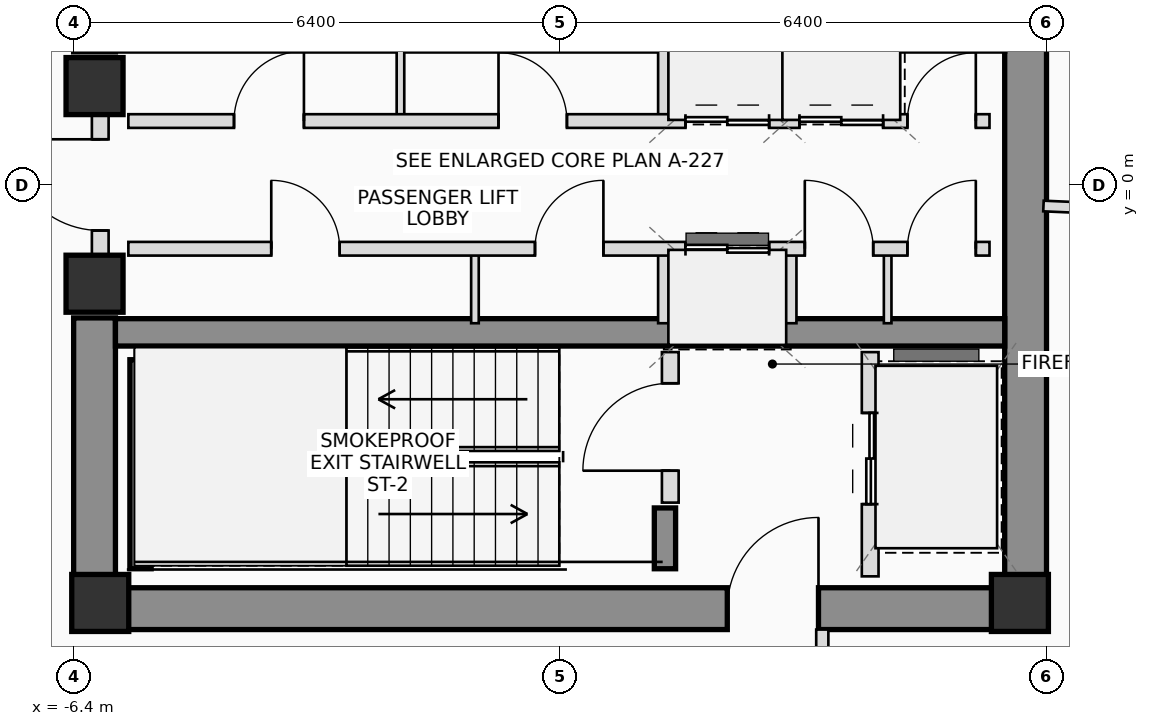
"""IFC4 building model, lengths in metres.
Left out: names, types, materials, properties, quantities, classifications, styles, units other than length and angle.
Written with IfcOpenShell. Run it as: python <this file> out.ifc"""

import sys

from ifc_helpers import new_model, si_unit, direction, frame, frame_2d, origin, origin_2d, place, context, subcontext, project, spatial, rectangle, extrude, source, transform, mapped, element, fill, save


model = new_model("IFC4")
c1 = context("Model", 3, precision=1e-05, world=origin(), true_north=direction((0.0, 1.0)))
c2 = subcontext(c1, "Body", "Model", "MODEL_VIEW")
j1 = project(units=[si_unit("LENGTHUNIT", "METRE"), si_unit("PLANEANGLEUNIT", "RADIAN")], contexts=[c1])
p1 = place(None, origin())
s1 = spatial("IfcSite", under=j1, at=p1, CompositionType="ELEMENT")
p2 = place(p1, origin())
s2 = spatial("IfcBuilding", under=s1, at=p2, CompositionType="ELEMENT")
p3 = place(p2, frame((0.0, 0.0, 296.75)))
s3 = spatial("IfcBuildingStorey", under=s2, at=p3, CompositionType="ELEMENT", Elevation=296.75)
m1 = source(origin(), c2, "Body", "SweptSolid", [
    extrude(rectangle(XDim=0.75, YDim=0.75, at=origin_2d()), origin(), (0.0, 0.0, 1.0), 3.45),
])
for number, where, z_axis, x_axis in (
    (1, (-6.05, -5.5, 0.0), (0.0, 0.0, 1.0), (1.0, 0.0, 0.0)),
    (2, (6.05, -5.5, 0.0), (0.0, 0.0, 1.0), (1.0, 0.0, 0.0)),
):
    element("IfcColumn", number, at=place(p3, frame(where, z_axis=z_axis, x_axis=x_axis)), inside=s3, PredefinedType="COLUMN", context=c2, shape_type="MappedRepresentation", body=[
        mapped(m1, transform((0.0, 0.0, 0.0), scale=1.0)),
    ])
p4 = place(p3, frame((-6.4, -5.575, 0.0), z_axis=(0.0, 0.0, 1.0), x_axis=(1.0, 0.0, 0.0)))
e3 = element("IfcWall", 3, at=p4, inside=s3, PredefinedType="SHEAR", context=c2, shape_type="SweptSolid", body=[
    extrude(rectangle(XDim=12.8, YDim=0.55, at=frame_2d((6.4, 0.0))), origin(), (0.0, 0.0, 1.0), 3.45),
])
p5 = place(p4, frame((8.6, 0.0, 0.0)))
e4 = element("IfcOpeningElement", 4, at=p5, cuts=e3, PredefinedType="OPENING", context=c2, shape_type="SweptSolid", body=[
    extrude(rectangle(XDim=1.2, YDim=2.2, at=frame_2d((0.6, 1.1))), frame((0.0, 0.285, 0.0), z_axis=(0.0, -1.0, 0.0), x_axis=(1.0, 0.0, 0.0)), (0.0, 0.0, 1.0), 0.57),
])
p6 = place(p3, frame((6.125, -5.3, 0.0), z_axis=(0.0, 0.0, 1.0), x_axis=(0.0, 1.0, 0.0)))
e5 = element("IfcWall", 5, at=p6, inside=s3, PredefinedType="SHEAR", context=c2, shape_type="SweptSolid", body=[
    extrude(rectangle(XDim=10.6, YDim=0.55, at=frame_2d((5.3, 0.0))), origin(), (0.0, 0.0, 1.0), 3.45),
])
p7 = place(p3, frame((-6.125, -5.3, 0.0), z_axis=(0.0, 0.0, 1.0), x_axis=(0.0, 1.0, 0.0)))
e6 = element("IfcWall", 6, at=p7, inside=s3, PredefinedType="SHEAR", context=c2, shape_type="SweptSolid", body=[
    extrude(rectangle(XDim=3.55, YDim=0.55, at=frame_2d((1.775, 0.0))), origin(), (0.0, 0.0, 1.0), 3.45),
])
p8 = place(p3, frame((-5.85, -1.94, 0.0), z_axis=(0.0, 0.0, 1.0), x_axis=(1.0, 0.0, 0.0)))
e7 = element("IfcWall", 7, at=p8, inside=s3, PredefinedType="SHEAR", context=c2, shape_type="SweptSolid", body=[
    extrude(rectangle(XDim=11.7, YDim=0.36, at=frame_2d((5.85, 0.0))), origin(), (0.0, 0.0, 1.0), 3.45),
])
p9 = place(p3, frame((-5.52, -5.05, 0.0), z_axis=(0.0, 0.0, 1.0), x_axis=(0.0, 1.0, 0.0)))
e8 = element("IfcWall", 8, at=p9, inside=s3, PredefinedType="SHEAR", context=c2, shape_type="SweptSolid", body=[
    extrude(rectangle(XDim=2.75, YDim=0.28, at=frame_2d((1.375, 0.0))), origin(), (0.0, 0.0, 1.0), 3.45),
])
p10 = place(p3, frame((1.38, -5.05, 0.0), z_axis=(0.0, 0.0, 1.0), x_axis=(0.0, 1.0, 0.0)))
e9 = element("IfcWall", 9, at=p10, inside=s3, PredefinedType="SHEAR", context=c2, shape_type="SweptSolid", body=[
    extrude(rectangle(XDim=0.8, YDim=0.28, at=frame_2d((0.4, 0.0))), origin(), (0.0, 0.0, 1.0), 3.45),
])
for number, where, z_axis, x_axis in (
    (10, (-6.125, -1.3, 0.0), (0.0, 0.0, 1.0), (1.0, 0.0, 0.0)),
    (11, (-6.125, 1.3, 0.0), (0.0, 0.0, 1.0), (1.0, 0.0, 0.0)),
):
    element("IfcColumn", number, at=place(p3, frame(where, z_axis=z_axis, x_axis=x_axis)), inside=s3, PredefinedType="COLUMN", context=c2, shape_type="MappedRepresentation", body=[
        mapped(m1, transform((0.0, 0.0, 0.0), scale=1.0)),
    ])
p11 = place(p3, frame((-6.05, -0.95, 0.0), z_axis=(0.0, 0.0, 1.0), x_axis=(0.0, 1.0, 0.0)))
e12 = element("IfcWall", 12, at=p11, inside=s3, PredefinedType="PLUMBINGWALL", context=c2, shape_type="SweptSolid", body=[
    extrude(rectangle(XDim=1.9, YDim=0.22, at=frame_2d((0.95, 0.0))), origin(), (0.0, 0.0, 1.0), 2.23),
])
p12 = place(p11, frame((0.35, 0.0, 0.0)))
e13 = element("IfcOpeningElement", 13, at=p12, cuts=e12, PredefinedType="OPENING", context=c2, shape_type="SweptSolid", body=[
    extrude(rectangle(XDim=1.2, YDim=2.2, at=frame_2d((0.6, 1.1))), frame((0.0, 0.12, 0.0), z_axis=(0.0, -1.0, 0.0), x_axis=(1.0, 0.0, 0.0)), (0.0, 0.0, 1.0), 0.24),
])
p13 = place(p3, frame((1.45, -4.18, 0.0), z_axis=(0.0, 0.0, 1.0), x_axis=(0.0, 1.0, 0.0)))
e14 = element("IfcWall", 14, at=p13, inside=s3, PredefinedType="PLUMBINGWALL", context=c2, shape_type="SweptSolid", body=[
    extrude(rectangle(XDim=1.98, YDim=0.22, at=frame_2d((0.99, 0.0))), origin(), (0.0, 0.0, 1.0), 3.25),
])
p14 = place(p13, frame((0.42, 0.0, 0.0)))
e15 = element("IfcOpeningElement", 15, at=p14, cuts=e14, PredefinedType="OPENING", context=c2, shape_type="SweptSolid", body=[
    extrude(rectangle(XDim=1.15, YDim=2.15, at=frame_2d((0.575, 1.075))), frame((0.0, 0.12, 0.0), z_axis=(0.0, -1.0, 0.0), x_axis=(1.0, 0.0, 0.0)), (0.0, 0.0, 1.0), 0.24),
])
p15 = place(p3, frame((4.08, -5.15, 0.0), z_axis=(0.0, 0.0, 1.0), x_axis=(0.0, 1.0, 0.0)))
e16 = element("IfcWall", 16, at=p15, inside=s3, PredefinedType="PLUMBINGWALL", context=c2, shape_type="SweptSolid", body=[
    extrude(rectangle(XDim=2.95, YDim=0.22, at=frame_2d((1.475, 0.0))), origin(), (0.0, 0.0, 1.0), 3.25),
])
p16 = place(p15, frame((0.95, 0.0, 0.0)))
e17 = element("IfcOpeningElement", 17, at=p16, cuts=e16, PredefinedType="OPENING", context=c2, shape_type="SweptSolid", body=[
    extrude(rectangle(XDim=1.2, YDim=2.25, at=frame_2d((0.6, 1.125))), frame((0.0, 0.12, 0.0), z_axis=(0.0, -1.0, 0.0), x_axis=(1.0, 0.0, 0.0)), (0.0, 0.0, 1.0), 0.24),
])
for number, where, z_axis, x_axis in (
    (18, (-2.1, 0.84, 0.0), (0.0, 0.0, 1.0), (0.0, 1.0, 0.0)),
    (19, (-1.12, -1.82, 0.0), (0.0, 0.0, 1.0), (0.0, 1.0, 0.0)),
):
    element("IfcWall", number, at=place(p3, frame(where, z_axis=z_axis, x_axis=x_axis)), inside=s3, PredefinedType="PARTITIONING", context=c2, shape_type="SweptSolid", body=[
        extrude(rectangle(XDim=0.98, YDim=0.1, at=frame_2d((0.49, 0.0))), origin(), (0.0, 0.0, 1.0), 3.25),
    ])
for number, where, z_axis, x_axis in (
    (20, (1.38, 0.84, 0.0), (0.0, 0.0, 1.0), (0.0, 1.0, 0.0)),
    (21, (1.38, -1.82, 0.0), (0.0, 0.0, 1.0), (0.0, 1.0, 0.0)),
    (22, (3.02, 0.84, 0.0), (0.0, 0.0, 1.0), (0.0, 1.0, 0.0)),
    (23, (4.38, 0.84, 0.0), (0.0, 0.0, 1.0), (0.0, 1.0, 0.0)),
    (24, (3.02, -1.82, 0.0), (0.0, 0.0, 1.0), (0.0, 1.0, 0.0)),
):
    element("IfcWall", number, at=place(p3, frame(where, z_axis=z_axis, x_axis=x_axis)), inside=s3, PredefinedType="PLUMBINGWALL", context=c2, shape_type="SweptSolid", body=[
        extrude(rectangle(XDim=0.98, YDim=0.18, at=frame_2d((0.49, 0.0))), origin(), (0.0, 0.0, 1.0), 3.25),
    ])
p17 = place(p3, frame((4.31, -1.82, 0.0), z_axis=(0.0, 0.0, 1.0), x_axis=(0.0, 1.0, 0.0)))
e25 = element("IfcWall", 25, at=p17, inside=s3, PredefinedType="PARTITIONING", context=c2, shape_type="SweptSolid", body=[
    extrude(rectangle(XDim=0.98, YDim=0.1, at=frame_2d((0.49, 0.0))), origin(), (0.0, 0.0, 1.0), 3.25),
])
p18 = place(p3, frame((-5.68, 0.84, 0.0), z_axis=(0.0, 0.0, 1.0), x_axis=(1.0, 0.0, 0.0)))
e26 = element("IfcWall", 26, at=p18, inside=s3, PredefinedType="PLUMBINGWALL", context=c2, shape_type="SweptSolid", body=[
    extrude(rectangle(XDim=11.33, YDim=0.18, at=frame_2d((5.665, 0.0))), origin(), (0.0, 0.0, 1.0), 3.25),
])
p19 = place(p18, frame((1.39, 0.0, 0.0)))
e27 = element("IfcOpeningElement", 27, at=p19, cuts=e26, PredefinedType="OPENING", context=c2, shape_type="SweptSolid", body=[
    extrude(rectangle(XDim=0.92, YDim=2.1, at=frame_2d((0.46, 1.05))), frame((0.0, 0.1, 0.0), z_axis=(0.0, -1.0, 0.0), x_axis=(1.0, 0.0, 0.0)), (0.0, 0.0, 1.0), 0.2),
])
p20 = place(p18, frame((4.87, 0.0, 0.0)))
e28 = element("IfcOpeningElement", 28, at=p20, cuts=e26, PredefinedType="OPENING", context=c2, shape_type="SweptSolid", body=[
    extrude(rectangle(XDim=0.9, YDim=2.05, at=frame_2d((0.45, 1.025))), frame((0.0, 0.1, 0.0), z_axis=(0.0, -1.0, 0.0), x_axis=(1.0, 0.0, 0.0)), (0.0, 0.0, 1.0), 0.2),
])
p21 = place(p18, frame((7.33, 0.0, 0.0)))
e29 = element("IfcOpeningElement", 29, at=p21, cuts=e26, PredefinedType="OPENING", context=c2, shape_type="SweptSolid", body=[
    extrude(rectangle(XDim=1.1, YDim=2.2, at=frame_2d((0.55, 1.1))), frame((0.0, 0.1, 0.0), z_axis=(0.0, -1.0, 0.0), x_axis=(1.0, 0.0, 0.0)), (0.0, 0.0, 1.0), 0.2),
])
p22 = place(p18, frame((8.83, 0.0, 0.0)))
e30 = element("IfcOpeningElement", 30, at=p22, cuts=e26, PredefinedType="OPENING", context=c2, shape_type="SweptSolid", body=[
    extrude(rectangle(XDim=1.1, YDim=2.2, at=frame_2d((0.55, 1.1))), frame((0.0, 0.1, 0.0), z_axis=(0.0, -1.0, 0.0), x_axis=(1.0, 0.0, 0.0)), (0.0, 0.0, 1.0), 0.2),
])
p23 = place(p18, frame((10.25, 0.0, 0.0)))
e31 = element("IfcOpeningElement", 31, at=p23, cuts=e26, PredefinedType="OPENING", context=c2, shape_type="SweptSolid", body=[
    extrude(rectangle(XDim=0.9, YDim=2.05, at=frame_2d((0.45, 1.025))), frame((0.0, 0.1, 0.0), z_axis=(0.0, -1.0, 0.0), x_axis=(1.0, 0.0, 0.0)), (0.0, 0.0, 1.0), 0.2),
])
p24 = place(p3, frame((-5.68, -0.84, 0.0), z_axis=(0.0, 0.0, 1.0), x_axis=(1.0, 0.0, 0.0)))
e32 = element("IfcWall", 32, at=p24, inside=s3, PredefinedType="PLUMBINGWALL", context=c2, shape_type="SweptSolid", body=[
    extrude(rectangle(XDim=11.33, YDim=0.18, at=frame_2d((5.665, 0.0))), origin(), (0.0, 0.0, 1.0), 3.25),
])
p25 = place(p24, frame((1.88, 0.0, 0.0)))
e33 = element("IfcOpeningElement", 33, at=p25, cuts=e32, PredefinedType="OPENING", context=c2, shape_type="SweptSolid", body=[
    extrude(rectangle(XDim=0.9, YDim=2.05, at=frame_2d((0.45, 1.025))), frame((0.0, 0.1, 0.0), z_axis=(0.0, -1.0, 0.0), x_axis=(1.0, 0.0, 0.0)), (0.0, 0.0, 1.0), 0.2),
])
p26 = place(p24, frame((5.35, 0.0, 0.0)))
e34 = element("IfcOpeningElement", 34, at=p26, cuts=e32, PredefinedType="OPENING", context=c2, shape_type="SweptSolid", body=[
    extrude(rectangle(XDim=0.9, YDim=2.05, at=frame_2d((0.45, 1.025))), frame((0.0, 0.1, 0.0), z_axis=(0.0, -1.0, 0.0), x_axis=(1.0, 0.0, 0.0)), (0.0, 0.0, 1.0), 0.2),
])
p27 = place(p24, frame((7.33, 0.0, 0.0)))
e35 = element("IfcOpeningElement", 35, at=p27, cuts=e32, PredefinedType="OPENING", context=c2, shape_type="SweptSolid", body=[
    extrude(rectangle(XDim=1.1, YDim=2.2, at=frame_2d((0.55, 1.1))), frame((0.0, 0.1, 0.0), z_axis=(0.0, -1.0, 0.0), x_axis=(1.0, 0.0, 0.0)), (0.0, 0.0, 1.0), 0.2),
])
p28 = place(p24, frame((8.9, 0.0, 0.0)))
e36 = element("IfcOpeningElement", 36, at=p28, cuts=e32, PredefinedType="OPENING", context=c2, shape_type="SweptSolid", body=[
    extrude(rectangle(XDim=0.9, YDim=2.05, at=frame_2d((0.45, 1.025))), frame((0.0, 0.1, 0.0), z_axis=(0.0, -1.0, 0.0), x_axis=(1.0, 0.0, 0.0)), (0.0, 0.0, 1.0), 0.2),
])
p29 = place(p24, frame((10.25, 0.0, 0.0)))
e37 = element("IfcOpeningElement", 37, at=p29, cuts=e32, PredefinedType="OPENING", context=c2, shape_type="SweptSolid", body=[
    extrude(rectangle(XDim=0.9, YDim=2.05, at=frame_2d((0.45, 1.025))), frame((0.0, 0.1, 0.0), z_axis=(0.0, -1.0, 0.0), x_axis=(1.0, 0.0, 0.0)), (0.0, 0.0, 1.0), 0.2),
])
p30 = place(p3, frame((3.45, -5.85, 0.0), z_axis=(0.0, 0.0, 1.0), x_axis=(0.0, -1.0, 0.0)))
e38 = element("IfcWall", 38, at=p30, inside=s3, PredefinedType="PARTITIONING", context=c2, shape_type="SweptSolid", body=[
    extrude(rectangle(XDim=1.575, YDim=0.16, at=frame_2d((0.787, 0.0))), origin(), (0.0, 0.0, 1.0), 2.855),
])
p31 = place(p30, frame((0.287, 0.0, 0.0)))
e39 = element("IfcOpeningElement", 39, at=p31, cuts=e38, PredefinedType="OPENING", context=c2, shape_type="SweptSolid", body=[
    extrude(rectangle(XDim=1.0, YDim=2.25, at=frame_2d((0.5, 1.125))), frame((0.0, 0.09, 0.0), z_axis=(0.0, -1.0, 0.0), x_axis=(1.0, 0.0, 0.0)), (0.0, 0.0, 1.0), 0.18),
])
p32 = place(p3, frame((6.36, -0.278, 0.0), z_axis=(0.0, 0.0, 1.0), x_axis=(0.999047623791, -0.043633076864, 0.0)))
e40 = element("IfcWall", 40, at=p32, inside=s3, PredefinedType="PARTITIONING", context=c2, shape_type="SweptSolid", body=[
    extrude(rectangle(XDim=13.524, YDim=0.14, at=frame_2d((6.762, 0.0))), origin(), (0.0, 0.0, 1.0), 2.815),
])
p33 = place(p5, origin())
e41 = element("IfcDoor", 41, at=p33, inside=s3, OperationType="SINGLE_SWING_RIGHT", PredefinedType="DOOR", context=c2, shape_type="SweptSolid", body=[
    extrude(rectangle(XDim=1.2, YDim=2.2, at=frame_2d((0.6, 1.1))), frame((0.0, 0.025, 0.0), z_axis=(0.0, -1.0, 0.0), x_axis=(1.0, 0.0, 0.0)), (0.0, 0.0, 1.0), 0.05),
])
fill(e4, e41)
p34 = place(p12, origin())
e42 = element("IfcDoor", 42, at=p34, inside=s3, OperationType="SINGLE_SWING_RIGHT", PredefinedType="DOOR", context=c2, shape_type="SweptSolid", body=[
    extrude(rectangle(XDim=1.2, YDim=2.2, at=frame_2d((0.6, 1.1))), frame((0.0, 0.025, 0.0), z_axis=(0.0, -1.0, 0.0), x_axis=(1.0, 0.0, 0.0)), (0.0, 0.0, 1.0), 0.05),
])
fill(e13, e42)
p35 = place(p14, origin())
e43 = element("IfcDoor", 43, at=p35, inside=s3, OperationType="SINGLE_SWING_LEFT", PredefinedType="DOOR", context=c2, shape_type="SweptSolid", body=[
    extrude(rectangle(XDim=1.15, YDim=2.15, at=frame_2d((0.575, 1.075))), frame((0.0, 0.025, 0.0), z_axis=(0.0, -1.0, 0.0), x_axis=(1.0, 0.0, 0.0)), (0.0, 0.0, 1.0), 0.05),
])
fill(e15, e43)
p36 = place(p16, origin())
e44 = element("IfcDoor", 44, at=p36, inside=s3, OperationType="DOUBLE_DOOR_SLIDING", PredefinedType="DOOR", context=c2, shape_type="SweptSolid", body=[
    extrude(rectangle(XDim=1.2, YDim=2.25, at=frame_2d((0.6, 1.125))), frame((0.0, 0.025, 0.0), z_axis=(0.0, -1.0, 0.0), x_axis=(1.0, 0.0, 0.0)), (0.0, 0.0, 1.0), 0.05),
])
fill(e17, e44)
p37 = place(p19, origin())
e45 = element("IfcDoor", 45, at=p37, inside=s3, OperationType="SINGLE_SWING_RIGHT", PredefinedType="DOOR", context=c2, shape_type="SweptSolid", body=[
    extrude(rectangle(XDim=0.92, YDim=2.1, at=frame_2d((0.46, 1.05))), frame((0.0, 0.025, 0.0), z_axis=(0.0, -1.0, 0.0), x_axis=(1.0, 0.0, 0.0)), (0.0, 0.0, 1.0), 0.05),
])
fill(e27, e45)
p38 = place(p20, origin())
e46 = element("IfcDoor", 46, at=p38, inside=s3, OperationType="SINGLE_SWING_LEFT", PredefinedType="DOOR", context=c2, shape_type="SweptSolid", body=[
    extrude(rectangle(XDim=0.9, YDim=2.05, at=frame_2d((0.45, 1.025))), frame((0.0, 0.025, 0.0), z_axis=(0.0, -1.0, 0.0), x_axis=(1.0, 0.0, 0.0)), (0.0, 0.0, 1.0), 0.05),
])
fill(e28, e46)
p39 = place(p21, origin())
e47 = element("IfcDoor", 47, at=p39, inside=s3, OperationType="DOUBLE_DOOR_SLIDING", PredefinedType="DOOR", context=c2, shape_type="SweptSolid", body=[
    extrude(rectangle(XDim=1.1, YDim=2.2, at=frame_2d((0.55, 1.1))), frame((0.0, 0.025, 0.0), z_axis=(0.0, -1.0, 0.0), x_axis=(1.0, 0.0, 0.0)), (0.0, 0.0, 1.0), 0.05),
])
fill(e29, e47)
p40 = place(p22, origin())
e48 = element("IfcDoor", 48, at=p40, inside=s3, OperationType="DOUBLE_DOOR_SLIDING", PredefinedType="DOOR", context=c2, shape_type="SweptSolid", body=[
    extrude(rectangle(XDim=1.1, YDim=2.2, at=frame_2d((0.55, 1.1))), frame((0.0, 0.025, 0.0), z_axis=(0.0, -1.0, 0.0), x_axis=(1.0, 0.0, 0.0)), (0.0, 0.0, 1.0), 0.05),
])
fill(e30, e48)
p41 = place(p23, origin())
e49 = element("IfcDoor", 49, at=p41, inside=s3, OperationType="SINGLE_SWING_RIGHT", PredefinedType="DOOR", context=c2, shape_type="SweptSolid", body=[
    extrude(rectangle(XDim=0.9, YDim=2.05, at=frame_2d((0.45, 1.025))), frame((0.0, 0.025, 0.0), z_axis=(0.0, -1.0, 0.0), x_axis=(1.0, 0.0, 0.0)), (0.0, 0.0, 1.0), 0.05),
])
fill(e31, e49)
p42 = place(p25, origin())
e50 = element("IfcDoor", 50, at=p42, inside=s3, OperationType="SINGLE_SWING_LEFT", PredefinedType="DOOR", context=c2, shape_type="SweptSolid", body=[
    extrude(rectangle(XDim=0.9, YDim=2.05, at=frame_2d((0.45, 1.025))), frame((0.0, 0.025, 0.0), z_axis=(0.0, -1.0, 0.0), x_axis=(1.0, 0.0, 0.0)), (0.0, 0.0, 1.0), 0.05),
])
fill(e33, e50)
p43 = place(p26, origin())
e51 = element("IfcDoor", 51, at=p43, inside=s3, OperationType="SINGLE_SWING_RIGHT", PredefinedType="DOOR", context=c2, shape_type="SweptSolid", body=[
    extrude(rectangle(XDim=0.9, YDim=2.05, at=frame_2d((0.45, 1.025))), frame((0.0, 0.025, 0.0), z_axis=(0.0, -1.0, 0.0), x_axis=(1.0, 0.0, 0.0)), (0.0, 0.0, 1.0), 0.05),
])
fill(e34, e51)
p44 = place(p27, origin())
e52 = element("IfcDoor", 52, at=p44, inside=s3, OperationType="DOUBLE_DOOR_SLIDING", PredefinedType="DOOR", context=c2, shape_type="SweptSolid", body=[
    extrude(rectangle(XDim=1.1, YDim=2.2, at=frame_2d((0.55, 1.1))), frame((0.0, 0.025, 0.0), z_axis=(0.0, -1.0, 0.0), x_axis=(1.0, 0.0, 0.0)), (0.0, 0.0, 1.0), 0.05),
])
fill(e35, e52)
p45 = place(p28, origin())
e53 = element("IfcDoor", 53, at=p45, inside=s3, OperationType="SINGLE_SWING_LEFT", PredefinedType="DOOR", context=c2, shape_type="SweptSolid", body=[
    extrude(rectangle(XDim=0.9, YDim=2.05, at=frame_2d((0.45, 1.025))), frame((0.0, 0.025, 0.0), z_axis=(0.0, -1.0, 0.0), x_axis=(1.0, 0.0, 0.0)), (0.0, 0.0, 1.0), 0.05),
])
fill(e36, e53)
p46 = place(p29, origin())
e54 = element("IfcDoor", 54, at=p46, inside=s3, OperationType="SINGLE_SWING_RIGHT", PredefinedType="DOOR", context=c2, shape_type="SweptSolid", body=[
    extrude(rectangle(XDim=0.9, YDim=2.05, at=frame_2d((0.45, 1.025))), frame((0.0, 0.025, 0.0), z_axis=(0.0, -1.0, 0.0), x_axis=(1.0, 0.0, 0.0)), (0.0, 0.0, 1.0), 0.05),
])
fill(e37, e54)
save(model, sys.argv[1])
